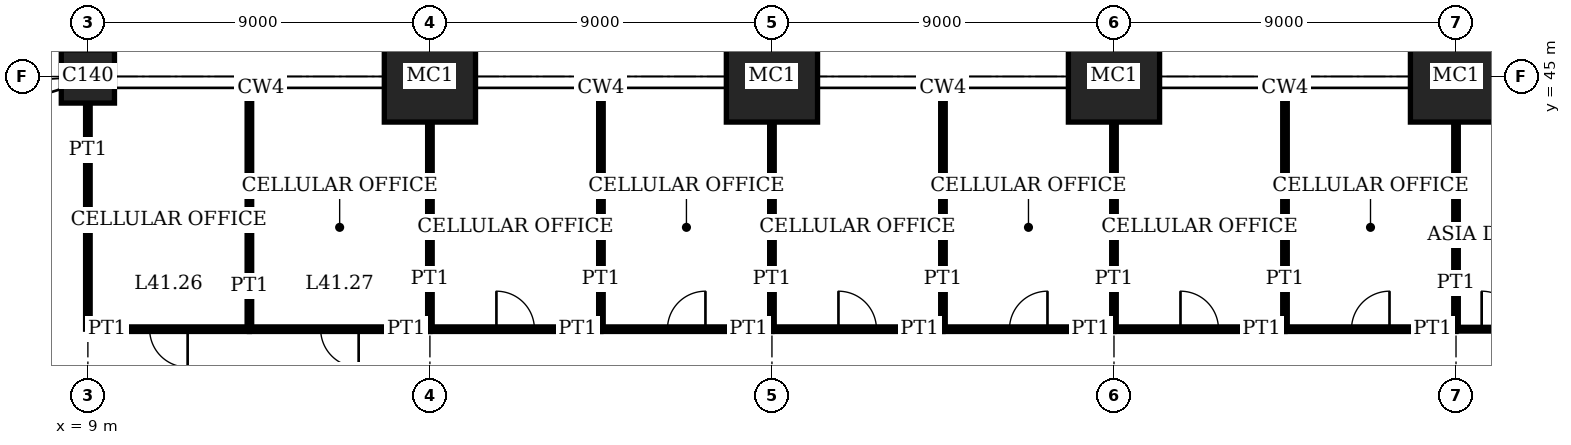
"""IFC4 building model, lengths in metres.
Left out: names, types, materials, properties, quantities, classifications, styles, units other than length and angle.
Written with IfcOpenShell. Run it as: python <this file> out.ifc"""

import sys

from ifc_helpers import new_model, si_unit, direction, frame, frame_2d, origin, origin_2d, place, context, subcontext, project, spatial, rectangle, extrude, element, fill, save


model = new_model("IFC4")
c1 = context("Model", 3, precision=1e-05, world=origin(), true_north=direction((0.0, 1.0)))
c2 = subcontext(c1, "Body", "Model", "MODEL_VIEW")
j1 = project(units=[si_unit("LENGTHUNIT", "METRE"), si_unit("PLANEANGLEUNIT", "RADIAN")], contexts=[c1])
p1 = place(None, origin())
s1 = spatial("IfcSite", under=j1, at=p1, CompositionType="ELEMENT")
p2 = place(p1, origin())
s2 = spatial("IfcBuilding", under=s1, at=p2, CompositionType="ELEMENT")
p3 = place(p2, frame((0.0, 0.0, 170.2)))
s3 = spatial("IfcBuildingStorey", under=s2, at=p3, CompositionType="ELEMENT", Elevation=170.2)
p4 = place(p3, frame((9.0, 45.0, 0.0), z_axis=(0.0, 0.0, 1.0), x_axis=(1.0, 0.0, 0.0)))
e1 = element("IfcColumn", 1, at=p4, inside=s3, PredefinedType="COLUMN", context=c2, shape_type="SweptSolid", body=[
    extrude(rectangle(XDim=1.4, YDim=1.4, at=origin_2d()), origin(), (0.0, 0.0, 1.0), 4.0),
])
for number, where, z_axis, x_axis in (
    (2, (18.0, 45.0, 0.0), (0.0, 0.0, 1.0), (1.0, 0.0, 0.0)),
    (3, (27.0, 45.0, 0.0), (0.0, 0.0, 1.0), (1.0, 0.0, 0.0)),
    (4, (36.0, 45.0, 0.0), (0.0, 0.0, 1.0), (1.0, 0.0, 0.0)),
    (5, (45.0, 45.0, 0.0), (0.0, 0.0, 1.0), (1.0, 0.0, 0.0)),
):
    element("IfcColumn", number, at=place(p3, frame(where, z_axis=z_axis, x_axis=x_axis)), inside=s3, PredefinedType="COLUMN", context=c2, shape_type="SweptSolid", body=[
        extrude(rectangle(XDim=2.4, YDim=2.4, at=origin_2d()), origin(), (0.0, 0.0, 1.0), 4.0),
    ])
p5 = place(p3, frame((9.0, 38.35, 0.0), z_axis=(0.0, 0.0, 1.0), x_axis=(1.0, 0.0, 0.0)))
e6 = element("IfcWall", 6, at=p5, inside=s3, PredefinedType="PARTITIONING", context=c2, shape_type="SweptSolid", body=[
    extrude(rectangle(XDim=4.25, YDim=0.12, at=frame_2d((2.125, 0.0))), origin(), (0.0, 0.0, 1.0), 3.75),
])
p6 = place(p5, frame((1.625, 0.0, 0.0)))
e7 = element("IfcOpeningElement", 7, at=p6, cuts=e6, PredefinedType="OPENING", context=c2, shape_type="SweptSolid", body=[
    extrude(rectangle(XDim=1.0, YDim=2.4, at=frame_2d((0.5, 1.2))), frame((0.0, 0.07, 0.0), z_axis=(0.0, -1.0, 0.0), x_axis=(1.0, 0.0, 0.0)), (0.0, 0.0, 1.0), 0.14),
])
p7 = place(p3, frame((13.25, 38.35, 0.0), z_axis=(0.0, 0.0, 1.0), x_axis=(1.0, 0.0, 0.0)))
e8 = element("IfcWall", 8, at=p7, inside=s3, PredefinedType="PARTITIONING", context=c2, shape_type="SweptSolid", body=[
    extrude(rectangle(XDim=4.75, YDim=0.12, at=frame_2d((2.375, 0.0))), origin(), (0.0, 0.0, 1.0), 3.75),
])
p8 = place(p7, frame((1.875, 0.0, 0.0)))
e9 = element("IfcOpeningElement", 9, at=p8, cuts=e8, PredefinedType="OPENING", context=c2, shape_type="SweptSolid", body=[
    extrude(rectangle(XDim=1.0, YDim=2.4, at=frame_2d((0.5, 1.2))), frame((0.0, 0.07, 0.0), z_axis=(0.0, -1.0, 0.0), x_axis=(1.0, 0.0, 0.0)), (0.0, 0.0, 1.0), 0.14),
])
p9 = place(p3, frame((18.0, 38.35, 0.0), z_axis=(0.0, 0.0, 1.0), x_axis=(1.0, 0.0, 0.0)))
e10 = element("IfcWall", 10, at=p9, inside=s3, PredefinedType="PARTITIONING", context=c2, shape_type="SweptSolid", body=[
    extrude(rectangle(XDim=4.5, YDim=0.12, at=frame_2d((2.25, 0.0))), origin(), (0.0, 0.0, 1.0), 3.75),
])
p10 = place(p9, frame((1.75, 0.0, 0.0)))
e11 = element("IfcOpeningElement", 11, at=p10, cuts=e10, PredefinedType="OPENING", context=c2, shape_type="SweptSolid", body=[
    extrude(rectangle(XDim=1.0, YDim=2.4, at=frame_2d((0.5, 1.2))), frame((0.0, 0.07, 0.0), z_axis=(0.0, -1.0, 0.0), x_axis=(1.0, 0.0, 0.0)), (0.0, 0.0, 1.0), 0.14),
])
p11 = place(p3, frame((22.5, 38.35, 0.0), z_axis=(0.0, 0.0, 1.0), x_axis=(1.0, 0.0, 0.0)))
e12 = element("IfcWall", 12, at=p11, inside=s3, PredefinedType="PARTITIONING", context=c2, shape_type="SweptSolid", body=[
    extrude(rectangle(XDim=4.5, YDim=0.12, at=frame_2d((2.25, 0.0))), origin(), (0.0, 0.0, 1.0), 3.75),
])
p12 = place(p11, frame((1.75, 0.0, 0.0)))
e13 = element("IfcOpeningElement", 13, at=p12, cuts=e12, PredefinedType="OPENING", context=c2, shape_type="SweptSolid", body=[
    extrude(rectangle(XDim=1.0, YDim=2.4, at=frame_2d((0.5, 1.2))), frame((0.0, 0.07, 0.0), z_axis=(0.0, -1.0, 0.0), x_axis=(1.0, 0.0, 0.0)), (0.0, 0.0, 1.0), 0.14),
])
p13 = place(p3, frame((27.0, 38.35, 0.0), z_axis=(0.0, 0.0, 1.0), x_axis=(1.0, 0.0, 0.0)))
e14 = element("IfcWall", 14, at=p13, inside=s3, PredefinedType="PARTITIONING", context=c2, shape_type="SweptSolid", body=[
    extrude(rectangle(XDim=4.5, YDim=0.12, at=frame_2d((2.25, 0.0))), origin(), (0.0, 0.0, 1.0), 3.75),
])
p14 = place(p13, frame((1.75, 0.0, 0.0)))
e15 = element("IfcOpeningElement", 15, at=p14, cuts=e14, PredefinedType="OPENING", context=c2, shape_type="SweptSolid", body=[
    extrude(rectangle(XDim=1.0, YDim=2.4, at=frame_2d((0.5, 1.2))), frame((0.0, 0.07, 0.0), z_axis=(0.0, -1.0, 0.0), x_axis=(1.0, 0.0, 0.0)), (0.0, 0.0, 1.0), 0.14),
])
p15 = place(p3, frame((31.5, 38.35, 0.0), z_axis=(0.0, 0.0, 1.0), x_axis=(1.0, 0.0, 0.0)))
e16 = element("IfcWall", 16, at=p15, inside=s3, PredefinedType="PARTITIONING", context=c2, shape_type="SweptSolid", body=[
    extrude(rectangle(XDim=4.5, YDim=0.12, at=frame_2d((2.25, 0.0))), origin(), (0.0, 0.0, 1.0), 3.75),
])
p16 = place(p15, frame((1.75, 0.0, 0.0)))
e17 = element("IfcOpeningElement", 17, at=p16, cuts=e16, PredefinedType="OPENING", context=c2, shape_type="SweptSolid", body=[
    extrude(rectangle(XDim=1.0, YDim=2.4, at=frame_2d((0.5, 1.2))), frame((0.0, 0.07, 0.0), z_axis=(0.0, -1.0, 0.0), x_axis=(1.0, 0.0, 0.0)), (0.0, 0.0, 1.0), 0.14),
])
p17 = place(p3, frame((36.0, 38.35, 0.0), z_axis=(0.0, 0.0, 1.0), x_axis=(1.0, 0.0, 0.0)))
e18 = element("IfcWall", 18, at=p17, inside=s3, PredefinedType="PARTITIONING", context=c2, shape_type="SweptSolid", body=[
    extrude(rectangle(XDim=4.5, YDim=0.12, at=frame_2d((2.25, 0.0))), origin(), (0.0, 0.0, 1.0), 3.75),
])
p18 = place(p17, frame((1.75, 0.0, 0.0)))
e19 = element("IfcOpeningElement", 19, at=p18, cuts=e18, PredefinedType="OPENING", context=c2, shape_type="SweptSolid", body=[
    extrude(rectangle(XDim=1.0, YDim=2.4, at=frame_2d((0.5, 1.2))), frame((0.0, 0.07, 0.0), z_axis=(0.0, -1.0, 0.0), x_axis=(1.0, 0.0, 0.0)), (0.0, 0.0, 1.0), 0.14),
])
p19 = place(p3, frame((40.5, 38.35, 0.0), z_axis=(0.0, 0.0, 1.0), x_axis=(1.0, 0.0, 0.0)))
e20 = element("IfcWall", 20, at=p19, inside=s3, PredefinedType="PARTITIONING", context=c2, shape_type="SweptSolid", body=[
    extrude(rectangle(XDim=4.5, YDim=0.12, at=frame_2d((2.25, 0.0))), origin(), (0.0, 0.0, 1.0), 3.75),
])
p20 = place(p19, frame((1.75, 0.0, 0.0)))
e21 = element("IfcOpeningElement", 21, at=p20, cuts=e20, PredefinedType="OPENING", context=c2, shape_type="SweptSolid", body=[
    extrude(rectangle(XDim=1.0, YDim=2.4, at=frame_2d((0.5, 1.2))), frame((0.0, 0.07, 0.0), z_axis=(0.0, -1.0, 0.0), x_axis=(1.0, 0.0, 0.0)), (0.0, 0.0, 1.0), 0.14),
])
p21 = place(p3, frame((45.0, 38.35, 0.0), z_axis=(0.0, 0.0, 1.0), x_axis=(1.0, 0.0, 0.0)))
e22 = element("IfcWall", 22, at=p21, inside=s3, PredefinedType="PARTITIONING", context=c2, shape_type="SweptSolid", body=[
    extrude(rectangle(XDim=2.35, YDim=0.1, at=frame_2d((1.175, 0.0))), origin(), (0.0, 0.0, 1.0), 3.75),
])
p22 = place(p21, frame((0.675, 0.0, 0.0)))
e23 = element("IfcOpeningElement", 23, at=p22, cuts=e22, PredefinedType="OPENING", context=c2, shape_type="SweptSolid", body=[
    extrude(rectangle(XDim=1.0, YDim=2.4, at=frame_2d((0.5, 1.2))), frame((0.0, 0.06, 0.0), z_axis=(0.0, -1.0, 0.0), x_axis=(1.0, 0.0, 0.0)), (0.0, 0.0, 1.0), 0.12),
])
p23 = place(p3, frame((9.0, 38.35, 0.0), z_axis=(0.0, 0.0, 1.0), x_axis=(0.0, 1.0, 0.0)))
e24 = element("IfcWall", 24, at=p23, inside=s3, PredefinedType="PARTITIONING", context=c2, shape_type="SweptSolid", body=[
    extrude(rectangle(XDim=5.95, YDim=0.12, at=frame_2d((2.975, 0.0))), origin(), (0.0, 0.0, 1.0), 3.05),
])
p24 = place(p3, frame((13.25, 38.35, 0.0), z_axis=(0.0, 0.0, 1.0), x_axis=(0.0, 1.0, 0.0)))
e25 = element("IfcWall", 25, at=p24, inside=s3, PredefinedType="PARTITIONING", context=c2, shape_type="SweptSolid", body=[
    extrude(rectangle(XDim=6.34, YDim=0.12, at=frame_2d((3.17, 0.0))), origin(), (0.0, 0.0, 1.0), 3.75),
])
p25 = place(p3, frame((18.0, 38.35, 0.0), z_axis=(0.0, 0.0, 1.0), x_axis=(0.0, 1.0, 0.0)))
e26 = element("IfcWall", 26, at=p25, inside=s3, PredefinedType="PARTITIONING", context=c2, shape_type="SweptSolid", body=[
    extrude(rectangle(XDim=5.45, YDim=0.12, at=frame_2d((2.725, 0.0))), origin(), (0.0, 0.0, 1.0), 3.05),
])
p26 = place(p3, frame((22.5, 38.35, 0.0), z_axis=(0.0, 0.0, 1.0), x_axis=(0.0, 1.0, 0.0)))
e27 = element("IfcWall", 27, at=p26, inside=s3, PredefinedType="PARTITIONING", context=c2, shape_type="SweptSolid", body=[
    extrude(rectangle(XDim=6.34, YDim=0.12, at=frame_2d((3.17, 0.0))), origin(), (0.0, 0.0, 1.0), 3.75),
])
p27 = place(p3, frame((27.0, 38.35, 0.0), z_axis=(0.0, 0.0, 1.0), x_axis=(0.0, 1.0, 0.0)))
e28 = element("IfcWall", 28, at=p27, inside=s3, PredefinedType="PARTITIONING", context=c2, shape_type="SweptSolid", body=[
    extrude(rectangle(XDim=5.45, YDim=0.12, at=frame_2d((2.725, 0.0))), origin(), (0.0, 0.0, 1.0), 3.05),
])
p28 = place(p3, frame((31.5, 38.35, 0.0), z_axis=(0.0, 0.0, 1.0), x_axis=(0.0, 1.0, 0.0)))
e29 = element("IfcWall", 29, at=p28, inside=s3, PredefinedType="PARTITIONING", context=c2, shape_type="SweptSolid", body=[
    extrude(rectangle(XDim=6.34, YDim=0.12, at=frame_2d((3.17, 0.0))), origin(), (0.0, 0.0, 1.0), 3.75),
])
p29 = place(p3, frame((36.0, 38.35, 0.0), z_axis=(0.0, 0.0, 1.0), x_axis=(0.0, 1.0, 0.0)))
e30 = element("IfcWall", 30, at=p29, inside=s3, PredefinedType="PARTITIONING", context=c2, shape_type="SweptSolid", body=[
    extrude(rectangle(XDim=5.45, YDim=0.12, at=frame_2d((2.725, 0.0))), origin(), (0.0, 0.0, 1.0), 3.05),
])
p30 = place(p3, frame((40.5, 38.35, 0.0), z_axis=(0.0, 0.0, 1.0), x_axis=(0.0, 1.0, 0.0)))
e31 = element("IfcWall", 31, at=p30, inside=s3, PredefinedType="PARTITIONING", context=c2, shape_type="SweptSolid", body=[
    extrude(rectangle(XDim=6.34, YDim=0.12, at=frame_2d((3.17, 0.0))), origin(), (0.0, 0.0, 1.0), 3.75),
])
p31 = place(p3, frame((45.0, 38.35, 0.0), z_axis=(0.0, 0.0, 1.0), x_axis=(0.0, 1.0, 0.0)))
e32 = element("IfcWall", 32, at=p31, inside=s3, PredefinedType="PARTITIONING", context=c2, shape_type="SweptSolid", body=[
    extrude(rectangle(XDim=5.45, YDim=0.12, at=frame_2d((2.725, 0.0))), origin(), (0.0, 0.0, 1.0), 3.05),
])
p32 = place(p6, origin())
e33 = element("IfcDoor", 33, at=p32, inside=s3, OperationType="SINGLE_SWING_RIGHT", PredefinedType="DOOR", context=c2, shape_type="SweptSolid", body=[
    extrude(rectangle(XDim=1.0, YDim=2.4, at=frame_2d((0.5, 1.2))), frame((0.0, 0.025, 0.0), z_axis=(0.0, -1.0, 0.0), x_axis=(1.0, 0.0, 0.0)), (0.0, 0.0, 1.0), 0.05),
])
fill(e7, e33)
p33 = place(p8, origin())
e34 = element("IfcDoor", 34, at=p33, inside=s3, OperationType="SINGLE_SWING_RIGHT", PredefinedType="DOOR", context=c2, shape_type="SweptSolid", body=[
    extrude(rectangle(XDim=1.0, YDim=2.4, at=frame_2d((0.5, 1.2))), frame((0.0, 0.025, 0.0), z_axis=(0.0, -1.0, 0.0), x_axis=(1.0, 0.0, 0.0)), (0.0, 0.0, 1.0), 0.05),
])
fill(e9, e34)
p34 = place(p10, origin())
e35 = element("IfcDoor", 35, at=p34, inside=s3, OperationType="SINGLE_SWING_RIGHT", PredefinedType="DOOR", context=c2, shape_type="SweptSolid", body=[
    extrude(rectangle(XDim=1.0, YDim=2.4, at=frame_2d((0.5, 1.2))), frame((0.0, 0.025, 0.0), z_axis=(0.0, -1.0, 0.0), x_axis=(1.0, 0.0, 0.0)), (0.0, 0.0, 1.0), 0.05),
])
fill(e11, e35)
p35 = place(p12, origin())
e36 = element("IfcDoor", 36, at=p35, inside=s3, OperationType="SINGLE_SWING_LEFT", PredefinedType="DOOR", context=c2, shape_type="SweptSolid", body=[
    extrude(rectangle(XDim=1.0, YDim=2.4, at=frame_2d((0.5, 1.2))), frame((0.0, 0.025, 0.0), z_axis=(0.0, -1.0, 0.0), x_axis=(1.0, 0.0, 0.0)), (0.0, 0.0, 1.0), 0.05),
])
fill(e13, e36)
p36 = place(p14, origin())
e37 = element("IfcDoor", 37, at=p36, inside=s3, OperationType="SINGLE_SWING_RIGHT", PredefinedType="DOOR", context=c2, shape_type="SweptSolid", body=[
    extrude(rectangle(XDim=1.0, YDim=2.4, at=frame_2d((0.5, 1.2))), frame((0.0, 0.025, 0.0), z_axis=(0.0, -1.0, 0.0), x_axis=(1.0, 0.0, 0.0)), (0.0, 0.0, 1.0), 0.05),
])
fill(e15, e37)
p37 = place(p16, origin())
e38 = element("IfcDoor", 38, at=p37, inside=s3, OperationType="SINGLE_SWING_LEFT", PredefinedType="DOOR", context=c2, shape_type="SweptSolid", body=[
    extrude(rectangle(XDim=1.0, YDim=2.4, at=frame_2d((0.5, 1.2))), frame((0.0, 0.025, 0.0), z_axis=(0.0, -1.0, 0.0), x_axis=(1.0, 0.0, 0.0)), (0.0, 0.0, 1.0), 0.05),
])
fill(e17, e38)
p38 = place(p18, origin())
e39 = element("IfcDoor", 39, at=p38, inside=s3, OperationType="SINGLE_SWING_RIGHT", PredefinedType="DOOR", context=c2, shape_type="SweptSolid", body=[
    extrude(rectangle(XDim=1.0, YDim=2.4, at=frame_2d((0.5, 1.2))), frame((0.0, 0.025, 0.0), z_axis=(0.0, -1.0, 0.0), x_axis=(1.0, 0.0, 0.0)), (0.0, 0.0, 1.0), 0.05),
])
fill(e19, e39)
p39 = place(p20, origin())
e40 = element("IfcDoor", 40, at=p39, inside=s3, OperationType="SINGLE_SWING_LEFT", PredefinedType="DOOR", context=c2, shape_type="SweptSolid", body=[
    extrude(rectangle(XDim=1.0, YDim=2.4, at=frame_2d((0.5, 1.2))), frame((0.0, 0.025, 0.0), z_axis=(0.0, -1.0, 0.0), x_axis=(1.0, 0.0, 0.0)), (0.0, 0.0, 1.0), 0.05),
])
fill(e21, e40)
p40 = place(p22, origin())
e41 = element("IfcDoor", 41, at=p40, inside=s3, OperationType="SINGLE_SWING_RIGHT", PredefinedType="DOOR", context=c2, shape_type="SweptSolid", body=[
    extrude(rectangle(XDim=1.0, YDim=2.4, at=frame_2d((0.5, 1.2))), frame((0.0, 0.02, 0.0), z_axis=(0.0, -1.0, 0.0), x_axis=(1.0, 0.0, 0.0)), (0.0, 0.0, 1.0), 0.04),
])
fill(e23, e41)
save(model, sys.argv[1])
